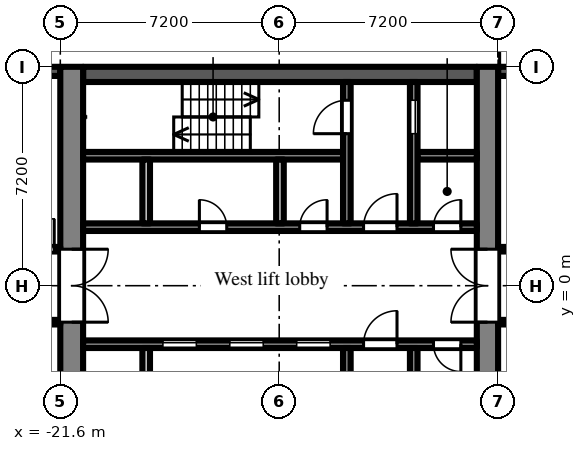
"""IFC4 building model, lengths in metres.
Left out: names, types, materials, properties, quantities, classifications, styles, units other than length and angle.
Written with IfcOpenShell. Run it as: python <this file> out.ifc"""

import sys

from ifc_helpers import new_model, si_unit, direction, frame, frame_2d, origin, place, context, subcontext, project, spatial, rectangle, extrude, element, fill, save


model = new_model("IFC4")
c1 = context("Model", 3, precision=1e-05, world=origin(), true_north=direction((0.0, 1.0)))
c2 = subcontext(c1, "Body", "Model", "MODEL_VIEW")
j1 = project(units=[si_unit("LENGTHUNIT", "METRE"), si_unit("PLANEANGLEUNIT", "RADIAN")], contexts=[c1])
p1 = place(None, origin())
s1 = spatial("IfcSite", under=j1, at=p1, CompositionType="ELEMENT")
p2 = place(p1, origin())
s2 = spatial("IfcBuilding", under=s1, at=p2, CompositionType="ELEMENT")
p3 = place(p2, frame((0.0, 0.0, 20.7)))
s3 = spatial("IfcBuildingStorey", under=s2, at=p3, CompositionType="ELEMENT", Elevation=20.7)
p4 = place(p3, frame((-4.2, 7.05, 0.0), z_axis=(0.0, 0.0, 1.0), x_axis=(-1.0, 0.0, 0.0)))
e1 = element("IfcWall", 1, at=p4, inside=s3, PredefinedType="SOLIDWALL", context=c2, shape_type="SweptSolid", body=[
    extrude(rectangle(XDim=3.0, YDim=0.3, at=frame_2d((1.5, 0.0))), origin(), (0.0, 0.0, 1.0), 2.1),
])
p5 = place(p3, frame((-21.6, 7.05, 0.0), z_axis=(0.0, 0.0, 1.0), x_axis=(-1.0, 0.0, 0.0)))
e2 = element("IfcWall", 2, at=p5, inside=s3, PredefinedType="SOLIDWALL", context=c2, shape_type="SweptSolid", body=[
    extrude(rectangle(XDim=2.7, YDim=0.3, at=frame_2d((1.35, 0.0))), origin(), (0.0, 0.0, 1.0), 2.1),
])
p6 = place(p5, frame((0.75, 0.0, 0.2)))
e3 = element("IfcOpeningElement", 3, at=p6, cuts=e2, PredefinedType="OPENING", context=c2, shape_type="SweptSolid", body=[
    extrude(rectangle(XDim=1.2, YDim=1.85, at=frame_2d((0.6, 0.925))), frame((0.0, 0.16, 0.0), z_axis=(0.0, -1.0, 0.0), x_axis=(1.0, 0.0, 0.0)), (0.0, 0.0, 1.0), 0.32),
])
p7 = place(p3, frame((-7.55, -7.2, 0.0), z_axis=(0.0, 0.0, 1.0), x_axis=(0.0, 1.0, 0.0)))
e4 = element("IfcWall", 4, at=p7, inside=s3, PredefinedType="SHEAR", context=c2, shape_type="SweptSolid", body=[
    extrude(rectangle(XDim=14.4, YDim=0.7, at=frame_2d((7.2, 0.0))), origin(), (0.0, 0.0, 1.0), 2.575),
])
p8 = place(p7, frame((6.0, 0.0, 0.0)))
e5 = element("IfcOpeningElement", 5, at=p8, cuts=e4, PredefinedType="OPENING", context=c2, shape_type="SweptSolid", body=[
    extrude(rectangle(XDim=2.4, YDim=2.2, at=frame_2d((1.2, 1.1))), frame((0.0, 0.36, 0.0), z_axis=(0.0, -1.0, 0.0), x_axis=(1.0, 0.0, 0.0)), (0.0, 0.0, 1.0), 0.72),
])
p9 = place(p3, frame((-21.225, -7.2, 0.0), z_axis=(0.0, 0.0, 1.0), x_axis=(0.0, 1.0, 0.0)))
e6 = element("IfcWall", 6, at=p9, inside=s3, PredefinedType="SHEAR", context=c2, shape_type="SweptSolid", body=[
    extrude(rectangle(XDim=14.4, YDim=0.75, at=frame_2d((7.2, 0.0))), origin(), (0.0, 0.0, 1.0), 2.575),
])
p10 = place(p9, frame((6.0, 0.0, 0.0)))
e7 = element("IfcOpeningElement", 7, at=p10, cuts=e6, PredefinedType="OPENING", context=c2, shape_type="SweptSolid", body=[
    extrude(rectangle(XDim=2.4, YDim=2.2, at=frame_2d((1.2, 1.1))), frame((0.0, 0.385, 0.0), z_axis=(0.0, -1.0, 0.0), x_axis=(1.0, 0.0, 0.0)), (0.0, 0.0, 1.0), 0.77),
])
p11 = place(p3, frame((-7.9, 6.95, 0.0), z_axis=(0.0, 0.0, 1.0), x_axis=(-1.0, 0.0, 0.0)))
e8 = element("IfcWall", 8, at=p11, inside=s3, PredefinedType="SHEAR", context=c2, shape_type="SweptSolid", body=[
    extrude(rectangle(XDim=12.95, YDim=0.5, at=frame_2d((6.475, 0.0))), origin(), (0.0, 0.0, 1.0), 2.575),
])
p12 = place(p3, frame((-7.9, 1.925, 0.0), z_axis=(0.0, 0.0, 1.0), x_axis=(-1.0, 0.0, 0.0)))
e9 = element("IfcWall", 9, at=p12, inside=s3, PredefinedType="SHEAR", context=c2, shape_type="SweptSolid", body=[
    extrude(rectangle(XDim=12.95, YDim=0.25, at=frame_2d((6.475, 0.0))), origin(), (0.0, 0.0, 1.0), 2.575),
])
p13 = place(p12, frame((0.525, 0.0, 0.0)))
e10 = element("IfcOpeningElement", 10, at=p13, cuts=e9, PredefinedType="OPENING", context=c2, shape_type="SweptSolid", body=[
    extrude(rectangle(XDim=0.9, YDim=2.1, at=frame_2d((0.45, 1.05))), frame((0.0, 0.135, 0.0), z_axis=(0.0, -1.0, 0.0), x_axis=(1.0, 0.0, 0.0)), (0.0, 0.0, 1.0), 0.27),
])
p14 = place(p12, frame((2.625, 0.0, 0.0)))
e11 = element("IfcOpeningElement", 11, at=p14, cuts=e9, PredefinedType="OPENING", context=c2, shape_type="SweptSolid", body=[
    extrude(rectangle(XDim=1.1, YDim=2.1, at=frame_2d((0.55, 1.05))), frame((0.0, 0.135, 0.0), z_axis=(0.0, -1.0, 0.0), x_axis=(1.0, 0.0, 0.0)), (0.0, 0.0, 1.0), 0.27),
])
p15 = place(p12, frame((4.925, 0.0, 0.0)))
e12 = element("IfcOpeningElement", 12, at=p15, cuts=e9, PredefinedType="OPENING", context=c2, shape_type="SweptSolid", body=[
    extrude(rectangle(XDim=0.9, YDim=2.1, at=frame_2d((0.45, 1.05))), frame((0.0, 0.135, 0.0), z_axis=(0.0, -1.0, 0.0), x_axis=(1.0, 0.0, 0.0)), (0.0, 0.0, 1.0), 0.27),
])
p16 = place(p12, frame((8.225, 0.0, 0.0)))
e13 = element("IfcOpeningElement", 13, at=p16, cuts=e9, PredefinedType="OPENING", context=c2, shape_type="SweptSolid", body=[
    extrude(rectangle(XDim=0.9, YDim=2.1, at=frame_2d((0.45, 1.05))), frame((0.0, 0.135, 0.0), z_axis=(0.0, -1.0, 0.0), x_axis=(1.0, 0.0, 0.0)), (0.0, 0.0, 1.0), 0.27),
])
p17 = place(p3, frame((-7.9, 4.275, 0.0), z_axis=(0.0, 0.0, 1.0), x_axis=(-1.0, 0.0, 0.0)))
e14 = element("IfcWall", 14, at=p17, inside=s3, PredefinedType="SHEAR", context=c2, shape_type="SweptSolid", body=[
    extrude(rectangle(XDim=1.95, YDim=0.25, at=frame_2d((0.975, 0.0))), origin(), (0.0, 0.0, 1.0), 2.575),
])
p18 = place(p3, frame((-12.3, 4.275, 0.0), z_axis=(0.0, 0.0, 1.0), x_axis=(-1.0, 0.0, 0.0)))
e15 = element("IfcWall", 15, at=p18, inside=s3, PredefinedType="SHEAR", context=c2, shape_type="SweptSolid", body=[
    extrude(rectangle(XDim=8.55, YDim=0.25, at=frame_2d((4.275, 0.0))), origin(), (0.0, 0.0, 1.0), 2.575),
])
p19 = place(p3, frame((-9.975, 2.05, 0.0), z_axis=(0.0, 0.0, 1.0), x_axis=(0.0, 1.0, 0.0)))
e16 = element("IfcWall", 16, at=p19, inside=s3, PredefinedType="SHEAR", context=c2, shape_type="SweptSolid", body=[
    extrude(rectangle(XDim=4.65, YDim=0.25, at=frame_2d((2.325, 0.0))), origin(), (0.0, 0.0, 1.0), 2.575),
])
p20 = place(p19, frame((2.95, 0.0, 0.0)))
e17 = element("IfcOpeningElement", 17, at=p20, cuts=e16, PredefinedType="OPENING", context=c2, shape_type="SweptSolid", body=[
    extrude(rectangle(XDim=1.1, YDim=2.1, at=frame_2d((0.55, 1.05))), frame((0.0, 0.135, 0.0), z_axis=(0.0, -1.0, 0.0), x_axis=(1.0, 0.0, 0.0)), (0.0, 0.0, 1.0), 0.27),
])
p21 = place(p3, frame((-12.175, 2.05, 0.0), z_axis=(0.0, 0.0, 1.0), x_axis=(0.0, 1.0, 0.0)))
e18 = element("IfcWall", 18, at=p21, inside=s3, PredefinedType="SHEAR", context=c2, shape_type="SweptSolid", body=[
    extrude(rectangle(XDim=4.65, YDim=0.25, at=frame_2d((2.325, 0.0))), origin(), (0.0, 0.0, 1.0), 2.575),
])
p22 = place(p21, frame((2.95, 0.0, 0.0)))
e19 = element("IfcOpeningElement", 19, at=p22, cuts=e18, PredefinedType="OPENING", context=c2, shape_type="SweptSolid", body=[
    extrude(rectangle(XDim=1.1, YDim=2.1, at=frame_2d((0.55, 1.05))), frame((0.0, 0.135, 0.0), z_axis=(0.0, -1.0, 0.0), x_axis=(1.0, 0.0, 0.0)), (0.0, 0.0, 1.0), 0.27),
])
for number, where, z_axis, x_axis in (
    (20, (-14.375, 2.05, 0.0), (0.0, 0.0, 1.0), (0.0, 1.0, 0.0)),
    (21, (-18.775, 2.05, 0.0), (0.0, 0.0, 1.0), (0.0, 1.0, 0.0)),
):
    element("IfcWall", number, at=place(p3, frame(where, z_axis=z_axis, x_axis=x_axis)), inside=s3, PredefinedType="PARTITIONING", context=c2, shape_type="SweptSolid", body=[
        extrude(rectangle(XDim=2.1, YDim=0.25, at=frame_2d((1.05, 0.0))), origin(), (0.0, 0.0, 1.0), 2.575),
    ])
p23 = place(p3, frame((-7.9, -1.925, 0.0), z_axis=(0.0, 0.0, 1.0), x_axis=(-1.0, 0.0, 0.0)))
e22 = element("IfcWall", 22, at=p23, inside=s3, PredefinedType="SHEAR", context=c2, shape_type="SweptSolid", body=[
    extrude(rectangle(XDim=12.95, YDim=0.25, at=frame_2d((6.475, 0.0))), origin(), (0.0, 0.0, 1.0), 2.575),
])
p24 = place(p23, frame((4.825, 0.0, 0.0)))
e23 = element("IfcOpeningElement", 23, at=p24, cuts=e22, PredefinedType="OPENING", context=c2, shape_type="SweptSolid", body=[
    extrude(rectangle(XDim=1.1, YDim=2.1, at=frame_2d((0.55, 1.05))), frame((0.0, 0.135, 0.0), z_axis=(0.0, -1.0, 0.0), x_axis=(1.0, 0.0, 0.0)), (0.0, 0.0, 1.0), 0.27),
])
p25 = place(p23, frame((7.025, 0.0, 0.0)))
e24 = element("IfcOpeningElement", 24, at=p25, cuts=e22, PredefinedType="OPENING", context=c2, shape_type="SweptSolid", body=[
    extrude(rectangle(XDim=1.1, YDim=2.1, at=frame_2d((0.55, 1.05))), frame((0.0, 0.135, 0.0), z_axis=(0.0, -1.0, 0.0), x_axis=(1.0, 0.0, 0.0)), (0.0, 0.0, 1.0), 0.27),
])
p26 = place(p23, frame((9.225, 0.0, 0.0)))
e25 = element("IfcOpeningElement", 25, at=p26, cuts=e22, PredefinedType="OPENING", context=c2, shape_type="SweptSolid", body=[
    extrude(rectangle(XDim=1.1, YDim=2.1, at=frame_2d((0.55, 1.05))), frame((0.0, 0.135, 0.0), z_axis=(0.0, -1.0, 0.0), x_axis=(1.0, 0.0, 0.0)), (0.0, 0.0, 1.0), 0.27),
])
p27 = place(p23, frame((0.525, 0.0, 0.0)))
e26 = element("IfcOpeningElement", 26, at=p27, cuts=e22, PredefinedType="OPENING", context=c2, shape_type="SweptSolid", body=[
    extrude(rectangle(XDim=0.9, YDim=2.1, at=frame_2d((0.45, 1.05))), frame((0.0, 0.135, 0.0), z_axis=(0.0, -1.0, 0.0), x_axis=(1.0, 0.0, 0.0)), (0.0, 0.0, 1.0), 0.27),
])
p28 = place(p23, frame((2.625, 0.0, 0.0)))
e27 = element("IfcOpeningElement", 27, at=p28, cuts=e22, PredefinedType="OPENING", context=c2, shape_type="SweptSolid", body=[
    extrude(rectangle(XDim=1.1, YDim=2.1, at=frame_2d((0.55, 1.05))), frame((0.0, 0.135, 0.0), z_axis=(0.0, -1.0, 0.0), x_axis=(1.0, 0.0, 0.0)), (0.0, 0.0, 1.0), 0.27),
])
p29 = place(p3, frame((-9.975, -2.05, 0.0), z_axis=(0.0, 0.0, 1.0), x_axis=(0.0, -1.0, 0.0)))
e28 = element("IfcWall", 28, at=p29, inside=s3, PredefinedType="SHEAR", context=c2, shape_type="SweptSolid", body=[
    extrude(rectangle(XDim=4.65, YDim=0.25, at=frame_2d((2.325, 0.0))), origin(), (0.0, 0.0, 1.0), 2.575),
])
p30 = place(p29, frame((2.95, 0.0, 0.0)))
e29 = element("IfcOpeningElement", 29, at=p30, cuts=e28, PredefinedType="OPENING", context=c2, shape_type="SweptSolid", body=[
    extrude(rectangle(XDim=1.1, YDim=2.1, at=frame_2d((0.55, 1.05))), frame((0.0, 0.135, 0.0), z_axis=(0.0, -1.0, 0.0), x_axis=(1.0, 0.0, 0.0)), (0.0, 0.0, 1.0), 0.27),
])
p31 = place(p3, frame((-12.175, -2.05, 0.0), z_axis=(0.0, 0.0, 1.0), x_axis=(0.0, -1.0, 0.0)))
e30 = element("IfcWall", 30, at=p31, inside=s3, PredefinedType="SHEAR", context=c2, shape_type="SweptSolid", body=[
    extrude(rectangle(XDim=4.65, YDim=0.25, at=frame_2d((2.325, 0.0))), origin(), (0.0, 0.0, 1.0), 2.575),
])
p32 = place(p31, frame((2.95, 0.0, 0.0)))
e31 = element("IfcOpeningElement", 31, at=p32, cuts=e30, PredefinedType="OPENING", context=c2, shape_type="SweptSolid", body=[
    extrude(rectangle(XDim=1.1, YDim=2.1, at=frame_2d((0.55, 1.05))), frame((0.0, 0.135, 0.0), z_axis=(0.0, -1.0, 0.0), x_axis=(1.0, 0.0, 0.0)), (0.0, 0.0, 1.0), 0.27),
])
p33 = place(p3, frame((-18.775, -2.05, 0.0), z_axis=(0.0, 0.0, 1.0), x_axis=(0.0, -1.0, 0.0)))
e32 = element("IfcWall", 32, at=p33, inside=s3, PredefinedType="PARTITIONING", context=c2, shape_type="SweptSolid", body=[
    extrude(rectangle(XDim=2.1, YDim=0.25, at=frame_2d((1.05, 0.0))), origin(), (0.0, 0.0, 1.0), 2.575),
])
p34 = place(p3, frame((-36.5, -1.2, 0.0), z_axis=(0.0, 0.0, 1.0), x_axis=(1.0, 0.0, 0.0)))
e33 = element("IfcWall", 33, at=p34, inside=s3, PredefinedType="PARTITIONING", context=c2, shape_type="SweptSolid", body=[
    extrude(rectangle(XDim=14.9, YDim=0.15, at=frame_2d((7.45, 0.0))), origin(), (0.0, 0.0, 1.0), 2.575),
])
p35 = place(p34, frame((13.55, 0.0, 0.0)))
e34 = element("IfcOpeningElement", 34, at=p35, cuts=e33, PredefinedType="OPENING", context=c2, shape_type="SweptSolid", body=[
    extrude(rectangle(XDim=0.9, YDim=2.1, at=frame_2d((0.45, 1.05))), frame((0.0, 0.085, 0.0), z_axis=(0.0, -1.0, 0.0), x_axis=(1.0, 0.0, 0.0)), (0.0, 0.0, 1.0), 0.17),
])
p36 = place(p34, frame((11.75, 0.0, 0.0)))
e35 = element("IfcOpeningElement", 35, at=p36, cuts=e33, PredefinedType="OPENING", context=c2, shape_type="SweptSolid", body=[
    extrude(rectangle(XDim=0.9, YDim=2.1, at=frame_2d((0.45, 1.05))), frame((0.0, 0.085, 0.0), z_axis=(0.0, -1.0, 0.0), x_axis=(1.0, 0.0, 0.0)), (0.0, 0.0, 1.0), 0.17),
])
p37 = place(p34, frame((9.05, 0.0, 0.0)))
e36 = element("IfcOpeningElement", 36, at=p37, cuts=e33, PredefinedType="OPENING", context=c2, shape_type="SweptSolid", body=[
    extrude(rectangle(XDim=0.9, YDim=2.1, at=frame_2d((0.45, 1.05))), frame((0.0, 0.085, 0.0), z_axis=(0.0, -1.0, 0.0), x_axis=(1.0, 0.0, 0.0)), (0.0, 0.0, 1.0), 0.17),
])
p38 = place(p34, frame((5.45, 0.0, 0.0)))
e37 = element("IfcOpeningElement", 37, at=p38, cuts=e33, PredefinedType="OPENING", context=c2, shape_type="SweptSolid", body=[
    extrude(rectangle(XDim=0.9, YDim=2.1, at=frame_2d((0.45, 1.05))), frame((0.0, 0.085, 0.0), z_axis=(0.0, -1.0, 0.0), x_axis=(1.0, 0.0, 0.0)), (0.0, 0.0, 1.0), 0.17),
])
p39 = place(p34, frame((1.15, 0.0, 0.0)))
e38 = element("IfcOpeningElement", 38, at=p39, cuts=e33, PredefinedType="OPENING", context=c2, shape_type="SweptSolid", body=[
    extrude(rectangle(XDim=1.8, YDim=2.1, at=frame_2d((0.9, 1.05))), frame((0.0, 0.085, 0.0), z_axis=(0.0, -1.0, 0.0), x_axis=(1.0, 0.0, 0.0)), (0.0, 0.0, 1.0), 0.17),
])
p40 = place(p3, frame((-36.5, 1.2, 0.0), z_axis=(0.0, 0.0, 1.0), x_axis=(1.0, 0.0, 0.0)))
e39 = element("IfcWall", 39, at=p40, inside=s3, PredefinedType="PARTITIONING", context=c2, shape_type="SweptSolid", body=[
    extrude(rectangle(XDim=14.9, YDim=0.15, at=frame_2d((7.45, 0.0))), origin(), (0.0, 0.0, 1.0), 2.575),
])
p41 = place(p40, frame((13.7, 0.0, 0.0)))
e40 = element("IfcOpeningElement", 40, at=p41, cuts=e39, PredefinedType="OPENING", context=c2, shape_type="SweptSolid", body=[
    extrude(rectangle(XDim=1.0, YDim=2.1, at=frame_2d((0.5, 1.05))), frame((0.0, 0.085, 0.0), z_axis=(0.0, -1.0, 0.0), x_axis=(1.0, 0.0, 0.0)), (0.0, 0.0, 1.0), 0.17),
])
p42 = place(p40, frame((9.05, 0.0, 0.0)))
e41 = element("IfcOpeningElement", 41, at=p42, cuts=e39, PredefinedType="OPENING", context=c2, shape_type="SweptSolid", body=[
    extrude(rectangle(XDim=0.9, YDim=2.1, at=frame_2d((0.45, 1.05))), frame((0.0, 0.085, 0.0), z_axis=(0.0, -1.0, 0.0), x_axis=(1.0, 0.0, 0.0)), (0.0, 0.0, 1.0), 0.17),
])
p43 = place(p40, frame((6.35, 0.0, 0.0)))
e42 = element("IfcOpeningElement", 42, at=p43, cuts=e39, PredefinedType="OPENING", context=c2, shape_type="SweptSolid", body=[
    extrude(rectangle(XDim=0.9, YDim=2.1, at=frame_2d((0.45, 1.05))), frame((0.0, 0.085, 0.0), z_axis=(0.0, -1.0, 0.0), x_axis=(1.0, 0.0, 0.0)), (0.0, 0.0, 1.0), 0.17),
])
p44 = place(p40, frame((4.55, 0.0, 0.0)))
e43 = element("IfcOpeningElement", 43, at=p44, cuts=e39, PredefinedType="OPENING", context=c2, shape_type="SweptSolid", body=[
    extrude(rectangle(XDim=0.9, YDim=2.1, at=frame_2d((0.45, 1.05))), frame((0.0, 0.085, 0.0), z_axis=(0.0, -1.0, 0.0), x_axis=(1.0, 0.0, 0.0)), (0.0, 0.0, 1.0), 0.17),
])
p45 = place(p40, frame((1.15, 0.0, 0.0)))
e44 = element("IfcOpeningElement", 44, at=p45, cuts=e39, PredefinedType="OPENING", context=c2, shape_type="SweptSolid", body=[
    extrude(rectangle(XDim=1.8, YDim=2.1, at=frame_2d((0.9, 1.05))), frame((0.0, 0.085, 0.0), z_axis=(0.0, -1.0, 0.0), x_axis=(1.0, 0.0, 0.0)), (0.0, 0.0, 1.0), 0.17),
])
p46 = place(p3, frame((-7.2, -1.2, 0.0), z_axis=(0.0, 0.0, 1.0), x_axis=(1.0, 0.0, 0.0)))
e45 = element("IfcWall", 45, at=p46, inside=s3, PredefinedType="PARTITIONING", context=c2, shape_type="SweptSolid", body=[
    extrude(rectangle(XDim=6.075, YDim=0.15, at=frame_2d((3.038, 0.0))), origin(), (0.0, 0.0, 1.0), 2.575),
])
p47 = place(p46, frame((2.55, 0.0, 0.0)))
e46 = element("IfcOpeningElement", 46, at=p47, cuts=e45, PredefinedType="OPENING", context=c2, shape_type="SweptSolid", body=[
    extrude(rectangle(XDim=0.9, YDim=2.1, at=frame_2d((0.45, 1.05))), frame((0.0, 0.085, 0.0), z_axis=(0.0, -1.0, 0.0), x_axis=(1.0, 0.0, 0.0)), (0.0, 0.0, 1.0), 0.17),
])
p48 = place(p3, frame((-7.2, 1.2, 0.0), z_axis=(0.0, 0.0, 1.0), x_axis=(1.0, 0.0, 0.0)))
e47 = element("IfcWall", 47, at=p48, inside=s3, PredefinedType="PARTITIONING", context=c2, shape_type="SweptSolid", body=[
    extrude(rectangle(XDim=6.075, YDim=0.15, at=frame_2d((3.038, 0.0))), origin(), (0.0, 0.0, 1.0), 2.575),
])
p49 = place(p48, frame((1.95, 0.0, 0.0)))
e48 = element("IfcOpeningElement", 48, at=p49, cuts=e47, PredefinedType="OPENING", context=c2, shape_type="SweptSolid", body=[
    extrude(rectangle(XDim=0.9, YDim=2.1, at=frame_2d((0.45, 1.05))), frame((0.0, 0.085, 0.0), z_axis=(0.0, -1.0, 0.0), x_axis=(1.0, 0.0, 0.0)), (0.0, 0.0, 1.0), 0.17),
])
p50 = place(p24, origin())
e49 = element("IfcDoor", 49, at=p50, inside=s3, OperationType="SLIDING_TO_LEFT", PredefinedType="DOOR", context=c2, shape_type="SweptSolid", body=[
    extrude(rectangle(XDim=1.1, YDim=2.1, at=frame_2d((0.55, 1.05))), frame((0.0, 0.025, 0.0), z_axis=(0.0, -1.0, 0.0), x_axis=(1.0, 0.0, 0.0)), (0.0, 0.0, 1.0), 0.05),
])
fill(e23, e49)
p51 = place(p25, origin())
e50 = element("IfcDoor", 50, at=p51, inside=s3, OperationType="SLIDING_TO_LEFT", PredefinedType="DOOR", context=c2, shape_type="SweptSolid", body=[
    extrude(rectangle(XDim=1.1, YDim=2.1, at=frame_2d((0.55, 1.05))), frame((0.0, 0.025, 0.0), z_axis=(0.0, -1.0, 0.0), x_axis=(1.0, 0.0, 0.0)), (0.0, 0.0, 1.0), 0.05),
])
fill(e24, e50)
p52 = place(p26, origin())
e51 = element("IfcDoor", 51, at=p52, inside=s3, OperationType="SLIDING_TO_LEFT", PredefinedType="DOOR", context=c2, shape_type="SweptSolid", body=[
    extrude(rectangle(XDim=1.1, YDim=2.1, at=frame_2d((0.55, 1.05))), frame((0.0, 0.025, 0.0), z_axis=(0.0, -1.0, 0.0), x_axis=(1.0, 0.0, 0.0)), (0.0, 0.0, 1.0), 0.05),
])
fill(e25, e51)
p53 = place(p20, origin())
e52 = element("IfcDoor", 52, at=p53, inside=s3, OperationType="SLIDING_TO_LEFT", PredefinedType="DOOR", context=c2, shape_type="SweptSolid", body=[
    extrude(rectangle(XDim=1.1, YDim=2.1, at=frame_2d((0.55, 1.05))), frame((0.0, 0.025, 0.0), z_axis=(0.0, -1.0, 0.0), x_axis=(1.0, 0.0, 0.0)), (0.0, 0.0, 1.0), 0.05),
])
fill(e17, e52)
p54 = place(p22, origin())
e53 = element("IfcDoor", 53, at=p54, inside=s3, OperationType="SINGLE_SWING_LEFT", PredefinedType="DOOR", context=c2, shape_type="SweptSolid", body=[
    extrude(rectangle(XDim=1.1, YDim=2.1, at=frame_2d((0.55, 1.05))), frame((0.0, 0.025, 0.0), z_axis=(0.0, -1.0, 0.0), x_axis=(1.0, 0.0, 0.0)), (0.0, 0.0, 1.0), 0.05),
])
fill(e19, e53)
p55 = place(p13, frame((0.9, 0.0, 0.0), z_axis=(0.0, 0.0, 1.0), x_axis=(-1.0, 0.0, 0.0)))
e54 = element("IfcDoor", 54, at=p55, inside=s3, OperationType="SINGLE_SWING_RIGHT", PredefinedType="DOOR", context=c2, shape_type="SweptSolid", body=[
    extrude(rectangle(XDim=0.9, YDim=2.1, at=frame_2d((0.45, 1.05))), frame((0.0, 0.025, 0.0), z_axis=(0.0, -1.0, 0.0), x_axis=(1.0, 0.0, 0.0)), (0.0, 0.0, 1.0), 0.05),
])
fill(e10, e54)
p56 = place(p27, origin())
e55 = element("IfcDoor", 55, at=p56, inside=s3, OperationType="SINGLE_SWING_LEFT", PredefinedType="DOOR", context=c2, shape_type="SweptSolid", body=[
    extrude(rectangle(XDim=0.9, YDim=2.1, at=frame_2d((0.45, 1.05))), frame((0.0, 0.025, 0.0), z_axis=(0.0, -1.0, 0.0), x_axis=(1.0, 0.0, 0.0)), (0.0, 0.0, 1.0), 0.05),
])
fill(e26, e55)
p57 = place(p14, frame((1.1, 0.0, 0.0), z_axis=(0.0, 0.0, 1.0), x_axis=(-1.0, 0.0, 0.0)))
e56 = element("IfcDoor", 56, at=p57, inside=s3, OperationType="SINGLE_SWING_RIGHT", PredefinedType="DOOR", context=c2, shape_type="SweptSolid", body=[
    extrude(rectangle(XDim=1.1, YDim=2.1, at=frame_2d((0.55, 1.05))), frame((0.0, 0.025, 0.0), z_axis=(0.0, -1.0, 0.0), x_axis=(1.0, 0.0, 0.0)), (0.0, 0.0, 1.0), 0.05),
])
fill(e11, e56)
p58 = place(p28, frame((1.1, 0.0, 0.0), z_axis=(0.0, 0.0, 1.0), x_axis=(-1.0, 0.0, 0.0)))
e57 = element("IfcDoor", 57, at=p58, inside=s3, OperationType="SINGLE_SWING_RIGHT", PredefinedType="DOOR", context=c2, shape_type="SweptSolid", body=[
    extrude(rectangle(XDim=1.1, YDim=2.1, at=frame_2d((0.55, 1.05))), frame((0.0, 0.025, 0.0), z_axis=(0.0, -1.0, 0.0), x_axis=(1.0, 0.0, 0.0)), (0.0, 0.0, 1.0), 0.05),
])
fill(e27, e57)
p59 = place(p8, origin())
e58 = element("IfcDoor", 58, at=p59, inside=s3, OperationType="DOUBLE_DOOR_DOUBLE_SWING", PredefinedType="DOOR", context=c2, shape_type="SweptSolid", body=[
    extrude(rectangle(XDim=2.4, YDim=2.2, at=frame_2d((1.2, 1.1))), frame((0.0, 0.025, 0.0), z_axis=(0.0, -1.0, 0.0), x_axis=(1.0, 0.0, 0.0)), (0.0, 0.0, 1.0), 0.05),
])
fill(e5, e58)
p60 = place(p10, frame((2.4, 0.0, 0.0), z_axis=(0.0, 0.0, 1.0), x_axis=(-1.0, 0.0, 0.0)))
e59 = element("IfcDoor", 59, at=p60, inside=s3, OperationType="DOUBLE_DOOR_DOUBLE_SWING", PredefinedType="DOOR", context=c2, shape_type="SweptSolid", body=[
    extrude(rectangle(XDim=2.4, YDim=2.2, at=frame_2d((1.2, 1.1))), frame((0.0, 0.025, 0.0), z_axis=(0.0, -1.0, 0.0), x_axis=(1.0, 0.0, 0.0)), (0.0, 0.0, 1.0), 0.05),
])
fill(e7, e59)
p61 = place(p15, frame((0.9, 0.0, 0.0), z_axis=(0.0, 0.0, 1.0), x_axis=(-1.0, 0.0, 0.0)))
e60 = element("IfcDoor", 60, at=p61, inside=s3, OperationType="SINGLE_SWING_RIGHT", PredefinedType="DOOR", context=c2, shape_type="SweptSolid", body=[
    extrude(rectangle(XDim=0.9, YDim=2.1, at=frame_2d((0.45, 1.05))), frame((0.0, 0.025, 0.0), z_axis=(0.0, -1.0, 0.0), x_axis=(1.0, 0.0, 0.0)), (0.0, 0.0, 1.0), 0.05),
])
fill(e12, e60)
p62 = place(p16, frame((0.9, 0.0, 0.0), z_axis=(0.0, 0.0, 1.0), x_axis=(-1.0, 0.0, 0.0)))
e61 = element("IfcDoor", 61, at=p62, inside=s3, OperationType="SINGLE_SWING_LEFT", PredefinedType="DOOR", context=c2, shape_type="SweptSolid", body=[
    extrude(rectangle(XDim=0.9, YDim=2.1, at=frame_2d((0.45, 1.05))), frame((0.0, 0.025, 0.0), z_axis=(0.0, -1.0, 0.0), x_axis=(1.0, 0.0, 0.0)), (0.0, 0.0, 1.0), 0.05),
])
fill(e13, e61)
p63 = place(p41, origin())
e62 = element("IfcDoor", 62, at=p63, inside=s3, OperationType="SINGLE_SWING_RIGHT", PredefinedType="DOOR", context=c2, shape_type="SweptSolid", body=[
    extrude(rectangle(XDim=1.0, YDim=2.1, at=frame_2d((0.5, 1.05))), frame((0.0, 0.025, 0.0), z_axis=(0.0, -1.0, 0.0), x_axis=(1.0, 0.0, 0.0)), (0.0, 0.0, 1.0), 0.05),
])
fill(e40, e62)
save(model, sys.argv[1])
